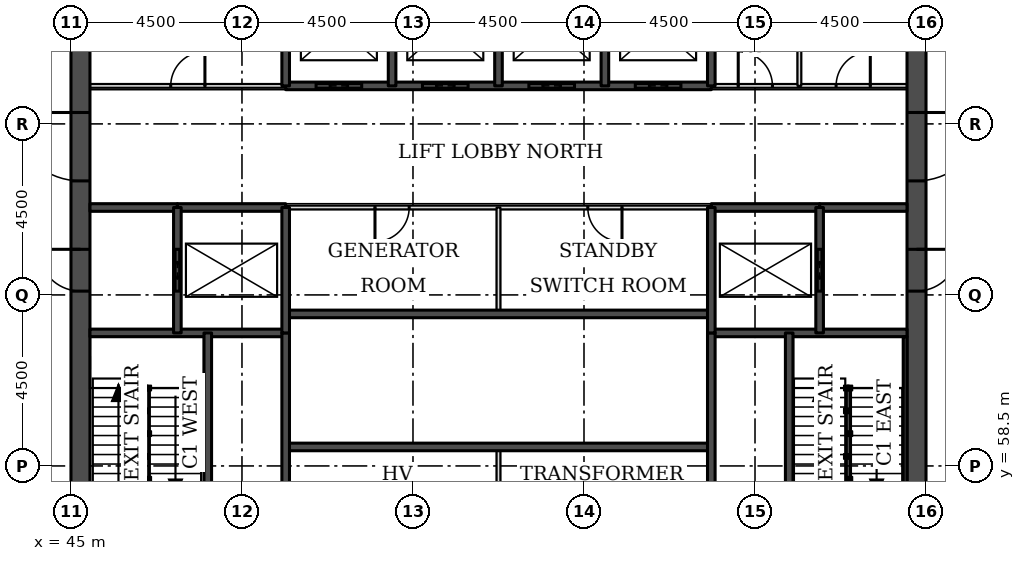
"""IFC4 building model, lengths in metres.
Left out: names, types, materials, properties, quantities, classifications, styles, units other than length and angle.
Written with IfcOpenShell. Run it as: python <this file> out.ifc"""

import sys

from ifc_helpers import new_model, si_unit, direction, frame, frame_2d, origin, place, context, subcontext, project, spatial, rectangle, extrude, element, fill, save


model = new_model("IFC4")
c1 = context("Model", 3, precision=1e-05, world=origin(), true_north=direction((0.0, 1.0)))
c2 = subcontext(c1, "Body", "Model", "MODEL_VIEW")
j1 = project(units=[si_unit("LENGTHUNIT", "METRE"), si_unit("PLANEANGLEUNIT", "RADIAN")], contexts=[c1])
p1 = place(None, origin())
s1 = spatial("IfcSite", under=j1, at=p1, CompositionType="ELEMENT")
p2 = place(p1, origin())
s2 = spatial("IfcBuilding", under=s1, at=p2, CompositionType="ELEMENT")
p3 = place(p2, frame((0.0, 0.0, -4.5)))
s3 = spatial("IfcBuildingStorey", under=s2, at=p3, CompositionType="ELEMENT", Elevation=-4.5)
p4 = place(p3, frame((45.25, 49.5, 0.0), z_axis=(0.0, 0.0, 1.0), x_axis=(0.0, 1.0, 0.0)))
e1 = element("IfcWall", 1, at=p4, inside=s3, PredefinedType="SHEAR", context=c2, shape_type="SweptSolid", body=[
    extrude(rectangle(XDim=22.5, YDim=0.5, at=frame_2d((11.25, 0.0))), origin(), (0.0, 0.0, 1.0), 4.5),
])
p5 = place(p4, frame((4.2, 0.0, 0.0)))
e2 = element("IfcOpeningElement", 2, at=p5, cuts=e1, PredefinedType="OPENING", context=c2, shape_type="SweptSolid", body=[
    extrude(rectangle(XDim=1.8, YDim=2.1, at=frame_2d((0.9, 1.05))), frame((0.0, 0.26, 0.0), z_axis=(0.0, -1.0, 0.0), x_axis=(1.0, 0.0, 0.0)), (0.0, 0.0, 1.0), 0.52),
])
p6 = place(p4, frame((6.9, 0.0, 0.0)))
e3 = element("IfcOpeningElement", 3, at=p6, cuts=e1, PredefinedType="OPENING", context=c2, shape_type="SweptSolid", body=[
    extrude(rectangle(XDim=1.1, YDim=2.1, at=frame_2d((0.55, 1.05))), frame((0.0, 0.26, 0.0), z_axis=(0.0, -1.0, 0.0), x_axis=(1.0, 0.0, 0.0)), (0.0, 0.0, 1.0), 0.52),
])
p7 = place(p4, frame((13.6, 0.0, 0.0)))
e4 = element("IfcOpeningElement", 4, at=p7, cuts=e1, PredefinedType="OPENING", context=c2, shape_type="SweptSolid", body=[
    extrude(rectangle(XDim=1.1, YDim=2.1, at=frame_2d((0.55, 1.05))), frame((0.0, 0.26, 0.0), z_axis=(0.0, -1.0, 0.0), x_axis=(1.0, 0.0, 0.0)), (0.0, 0.0, 1.0), 0.52),
])
p8 = place(p4, frame((16.5, 0.0, 0.0)))
e5 = element("IfcOpeningElement", 5, at=p8, cuts=e1, PredefinedType="OPENING", context=c2, shape_type="SweptSolid", body=[
    extrude(rectangle(XDim=1.8, YDim=2.1, at=frame_2d((0.9, 1.05))), frame((0.0, 0.26, 0.0), z_axis=(0.0, -1.0, 0.0), x_axis=(1.0, 0.0, 0.0)), (0.0, 0.0, 1.0), 0.52),
])
p9 = place(p3, frame((67.25, 49.5, 0.0), z_axis=(0.0, 0.0, 1.0), x_axis=(0.0, 1.0, 0.0)))
e6 = element("IfcWall", 6, at=p9, inside=s3, PredefinedType="SHEAR", context=c2, shape_type="SweptSolid", body=[
    extrude(rectangle(XDim=22.5, YDim=0.5, at=frame_2d((11.25, 0.0))), origin(), (0.0, 0.0, 1.0), 4.5),
])
p10 = place(p9, frame((4.2, 0.0, 0.0)))
e7 = element("IfcOpeningElement", 7, at=p10, cuts=e6, PredefinedType="OPENING", context=c2, shape_type="SweptSolid", body=[
    extrude(rectangle(XDim=1.8, YDim=2.1, at=frame_2d((0.9, 1.05))), frame((0.0, 0.26, 0.0), z_axis=(0.0, -1.0, 0.0), x_axis=(1.0, 0.0, 0.0)), (0.0, 0.0, 1.0), 0.52),
])
p11 = place(p9, frame((6.9, 0.0, 0.0)))
e8 = element("IfcOpeningElement", 8, at=p11, cuts=e6, PredefinedType="OPENING", context=c2, shape_type="SweptSolid", body=[
    extrude(rectangle(XDim=1.1, YDim=2.1, at=frame_2d((0.55, 1.05))), frame((0.0, 0.26, 0.0), z_axis=(0.0, -1.0, 0.0), x_axis=(1.0, 0.0, 0.0)), (0.0, 0.0, 1.0), 0.52),
])
p12 = place(p9, frame((13.6, 0.0, 0.0)))
e9 = element("IfcOpeningElement", 9, at=p12, cuts=e6, PredefinedType="OPENING", context=c2, shape_type="SweptSolid", body=[
    extrude(rectangle(XDim=1.1, YDim=2.1, at=frame_2d((0.55, 1.05))), frame((0.0, 0.26, 0.0), z_axis=(0.0, -1.0, 0.0), x_axis=(1.0, 0.0, 0.0)), (0.0, 0.0, 1.0), 0.52),
])
p13 = place(p9, frame((16.5, 0.0, 0.0)))
e10 = element("IfcOpeningElement", 10, at=p13, cuts=e6, PredefinedType="OPENING", context=c2, shape_type="SweptSolid", body=[
    extrude(rectangle(XDim=1.8, YDim=2.1, at=frame_2d((0.9, 1.05))), frame((0.0, 0.26, 0.0), z_axis=(0.0, -1.0, 0.0), x_axis=(1.0, 0.0, 0.0)), (0.0, 0.0, 1.0), 0.52),
])
p14 = place(p3, frame((50.65, 59.0, 0.0), z_axis=(0.0, 0.0, 1.0), x_axis=(1.0, 0.0, 0.0)))
e11 = element("IfcWall", 11, at=p14, inside=s3, PredefinedType="SOLIDWALL", context=c2, shape_type="SweptSolid", body=[
    extrude(rectangle(XDim=11.2, YDim=0.2, at=frame_2d((5.6, 0.0))), origin(), (0.0, 0.0, 1.0), 4.5),
])
for number, where, z_axis, x_axis in (
    (12, (45.5, 62.0, 0.0), (0.0, 0.0, 1.0), (1.0, 0.0, 0.0)),
    (13, (61.85, 62.0, 0.0), (0.0, 0.0, 1.0), (1.0, 0.0, 0.0)),
):
    element("IfcWall", number, at=place(p3, frame(where, z_axis=z_axis, x_axis=x_axis)), inside=s3, PredefinedType="SOLIDWALL", context=c2, shape_type="SweptSolid", body=[
        extrude(rectangle(XDim=5.15, YDim=0.2, at=frame_2d((2.575, 0.0))), origin(), (0.0, 0.0, 1.0), 4.1),
    ])
p15 = place(p3, frame((50.65, 62.5, 0.0), z_axis=(0.0, 0.0, 1.0), x_axis=(1.0, 0.0, 0.0)))
e14 = element("IfcWall", 14, at=p15, inside=s3, PredefinedType="SOLIDWALL", context=c2, shape_type="SweptSolid", body=[
    extrude(rectangle(XDim=11.2, YDim=0.2, at=frame_2d((5.6, 0.0))), origin(), (0.0, 0.0, 1.0), 4.5),
])
p16 = place(p3, frame((50.65, 65.3, 0.0), z_axis=(0.0, 0.0, 1.0), x_axis=(1.0, 0.0, 0.0)))
e15 = element("IfcWall", 15, at=p16, inside=s3, PredefinedType="PARTITIONING", context=c2, shape_type="SweptSolid", body=[
    extrude(rectangle(XDim=11.2, YDim=0.1, at=frame_2d((5.6, 0.0))), origin(), (0.0, 0.0, 1.0), 4.1),
])
p17 = place(p16, frame((2.35, 0.0, 0.0)))
e16 = element("IfcOpeningElement", 16, at=p17, cuts=e15, PredefinedType="OPENING", context=c2, shape_type="SweptSolid", body=[
    extrude(rectangle(XDim=0.9, YDim=2.1, at=frame_2d((0.45, 1.05))), frame((0.0, 0.06, 0.0), z_axis=(0.0, -1.0, 0.0), x_axis=(1.0, 0.0, 0.0)), (0.0, 0.0, 1.0), 0.12),
])
p18 = place(p16, frame((7.95, 0.0, 0.0)))
e17 = element("IfcOpeningElement", 17, at=p18, cuts=e15, PredefinedType="OPENING", context=c2, shape_type="SweptSolid", body=[
    extrude(rectangle(XDim=0.9, YDim=2.1, at=frame_2d((0.45, 1.05))), frame((0.0, 0.06, 0.0), z_axis=(0.0, -1.0, 0.0), x_axis=(1.0, 0.0, 0.0)), (0.0, 0.0, 1.0), 0.12),
])
for number, where, z_axis, x_axis in (
    (18, (45.5, 65.3, 0.0), (0.0, 0.0, 1.0), (1.0, 0.0, 0.0)),
    (19, (64.7, 65.3, 0.0), (0.0, 0.0, 1.0), (1.0, 0.0, 0.0)),
):
    element("IfcWall", number, at=place(p3, frame(where, z_axis=z_axis, x_axis=x_axis)), inside=s3, PredefinedType="SOLIDWALL", context=c2, shape_type="SweptSolid", body=[
        extrude(rectangle(XDim=2.3, YDim=0.2, at=frame_2d((1.15, 0.0))), origin(), (0.0, 0.0, 1.0), 4.1),
    ])
for number, where, z_axis, x_axis in (
    (20, (47.8, 65.3, 0.0), (0.0, 0.0, 1.0), (1.0, 0.0, 0.0)),
    (21, (61.85, 65.3, 0.0), (0.0, 0.0, 1.0), (1.0, 0.0, 0.0)),
):
    element("IfcWall", number, at=place(p3, frame(where, z_axis=z_axis, x_axis=x_axis)), inside=s3, PredefinedType="SOLIDWALL", context=c2, shape_type="SweptSolid", body=[
        extrude(rectangle(XDim=2.85, YDim=0.2, at=frame_2d((1.425, 0.0))), origin(), (0.0, 0.0, 1.0), 4.1),
    ])
p19 = place(p3, frame((45.5, 68.5, 0.0), z_axis=(0.0, 0.0, 1.0), x_axis=(1.0, 0.0, 0.0)))
e22 = element("IfcWall", 22, at=p19, inside=s3, PredefinedType="PARTITIONING", context=c2, shape_type="SweptSolid", body=[
    extrude(rectangle(XDim=5.15, YDim=0.1, at=frame_2d((2.575, 0.0))), origin(), (0.0, 0.0, 1.0), 4.1),
])
p20 = place(p19, frame((2.125, 0.0, 0.0)))
e23 = element("IfcOpeningElement", 23, at=p20, cuts=e22, PredefinedType="OPENING", context=c2, shape_type="SweptSolid", body=[
    extrude(rectangle(XDim=0.9, YDim=2.1, at=frame_2d((0.45, 1.05))), frame((0.0, 0.06, 0.0), z_axis=(0.0, -1.0, 0.0), x_axis=(1.0, 0.0, 0.0)), (0.0, 0.0, 1.0), 0.12),
])
p21 = place(p3, frame((61.85, 68.5, 0.0), z_axis=(0.0, 0.0, 1.0), x_axis=(1.0, 0.0, 0.0)))
e24 = element("IfcWall", 24, at=p21, inside=s3, PredefinedType="PARTITIONING", context=c2, shape_type="SweptSolid", body=[
    extrude(rectangle(XDim=5.15, YDim=0.1, at=frame_2d((2.575, 0.0))), origin(), (0.0, 0.0, 1.0), 4.1),
])
p22 = place(p21, frame((3.284, 0.0, 0.0)))
e25 = element("IfcOpeningElement", 25, at=p22, cuts=e24, PredefinedType="OPENING", context=c2, shape_type="SweptSolid", body=[
    extrude(rectangle(XDim=0.9, YDim=2.1, at=frame_2d((0.45, 1.05))), frame((0.0, 0.06, 0.0), z_axis=(0.0, -1.0, 0.0), x_axis=(1.0, 0.0, 0.0)), (0.0, 0.0, 1.0), 0.12),
])
p23 = place(p21, frame((0.709, 0.0, 0.0)))
e26 = element("IfcOpeningElement", 26, at=p23, cuts=e24, PredefinedType="OPENING", context=c2, shape_type="SweptSolid", body=[
    extrude(rectangle(XDim=0.9, YDim=2.1, at=frame_2d((0.45, 1.05))), frame((0.0, 0.06, 0.0), z_axis=(0.0, -1.0, 0.0), x_axis=(1.0, 0.0, 0.0)), (0.0, 0.0, 1.0), 0.12),
])
p24 = place(p3, frame((50.65, 68.5, 0.0), z_axis=(0.0, 0.0, 1.0), x_axis=(1.0, 0.0, 0.0)))
e27 = element("IfcWall", 27, at=p24, inside=s3, PredefinedType="SOLIDWALL", context=c2, shape_type="SweptSolid", body=[
    extrude(rectangle(XDim=11.2, YDim=0.2, at=frame_2d((5.6, 0.0))), origin(), (0.0, 0.0, 1.0), 4.1),
])
p25 = place(p24, frame((0.8, 0.0, 0.0)))
e28 = element("IfcOpeningElement", 28, at=p25, cuts=e27, PredefinedType="OPENING", context=c2, shape_type="SweptSolid", body=[
    extrude(rectangle(XDim=1.2, YDim=2.1, at=frame_2d((0.6, 1.05))), frame((0.0, 0.11, 0.0), z_axis=(0.0, -1.0, 0.0), x_axis=(1.0, 0.0, 0.0)), (0.0, 0.0, 1.0), 0.22),
])
p26 = place(p24, frame((3.6, 0.0, 0.0)))
e29 = element("IfcOpeningElement", 29, at=p26, cuts=e27, PredefinedType="OPENING", context=c2, shape_type="SweptSolid", body=[
    extrude(rectangle(XDim=1.2, YDim=2.1, at=frame_2d((0.6, 1.05))), frame((0.0, 0.11, 0.0), z_axis=(0.0, -1.0, 0.0), x_axis=(1.0, 0.0, 0.0)), (0.0, 0.0, 1.0), 0.22),
])
p27 = place(p24, frame((6.4, 0.0, 0.0)))
e30 = element("IfcOpeningElement", 30, at=p27, cuts=e27, PredefinedType="OPENING", context=c2, shape_type="SweptSolid", body=[
    extrude(rectangle(XDim=1.2, YDim=2.1, at=frame_2d((0.6, 1.05))), frame((0.0, 0.11, 0.0), z_axis=(0.0, -1.0, 0.0), x_axis=(1.0, 0.0, 0.0)), (0.0, 0.0, 1.0), 0.22),
])
p28 = place(p24, frame((9.2, 0.0, 0.0)))
e31 = element("IfcOpeningElement", 31, at=p28, cuts=e27, PredefinedType="OPENING", context=c2, shape_type="SweptSolid", body=[
    extrude(rectangle(XDim=1.2, YDim=2.1, at=frame_2d((0.6, 1.05))), frame((0.0, 0.11, 0.0), z_axis=(0.0, -1.0, 0.0), x_axis=(1.0, 0.0, 0.0)), (0.0, 0.0, 1.0), 0.22),
])
p29 = place(p3, frame((47.8, 62.0, 0.0), z_axis=(0.0, 0.0, 1.0), x_axis=(0.0, 1.0, 0.0)))
e32 = element("IfcWall", 32, at=p29, inside=s3, PredefinedType="SOLIDWALL", context=c2, shape_type="SweptSolid", body=[
    extrude(rectangle(XDim=3.3, YDim=0.2, at=frame_2d((1.65, 0.0))), origin(), (0.0, 0.0, 1.0), 4.1),
])
p30 = place(p29, frame((1.1, 0.0, 0.0)))
e33 = element("IfcOpeningElement", 33, at=p30, cuts=e32, PredefinedType="OPENING", context=c2, shape_type="SweptSolid", body=[
    extrude(rectangle(XDim=1.1, YDim=2.1, at=frame_2d((0.55, 1.05))), frame((0.0, 0.11, 0.0), z_axis=(0.0, -1.0, 0.0), x_axis=(1.0, 0.0, 0.0)), (0.0, 0.0, 1.0), 0.22),
])
p31 = place(p3, frame((48.6, 56.2, 0.0), z_axis=(0.0, 0.0, 1.0), x_axis=(0.0, 1.0, 0.0)))
e34 = element("IfcWall", 34, at=p31, inside=s3, PredefinedType="SOLIDWALL", context=c2, shape_type="SweptSolid", body=[
    extrude(rectangle(XDim=5.8, YDim=0.2, at=frame_2d((2.9, 0.0))), origin(), (0.0, 0.0, 1.0), 4.1),
])
p32 = place(p3, frame((50.65, 56.2, 0.0), z_axis=(0.0, 0.0, 1.0), x_axis=(0.0, 1.0, 0.0)))
e35 = element("IfcWall", 35, at=p32, inside=s3, PredefinedType="SOLIDWALL", context=c2, shape_type="SweptSolid", body=[
    extrude(rectangle(XDim=5.8, YDim=0.2, at=frame_2d((2.9, 0.0))), origin(), (0.0, 0.0, 1.0), 4.5),
])
p33 = place(p3, frame((50.65, 62.0, 0.0), z_axis=(0.0, 0.0, 1.0), x_axis=(0.0, 1.0, 0.0)))
e36 = element("IfcWall", 36, at=p33, inside=s3, PredefinedType="SOLIDWALL", context=c2, shape_type="SweptSolid", body=[
    extrude(rectangle(XDim=3.3, YDim=0.2, at=frame_2d((1.65, 0.0))), origin(), (0.0, 0.0, 1.0), 4.1),
])
for number, where, z_axis, x_axis in (
    (37, (50.65, 68.5, 0.0), (0.0, 0.0, 1.0), (0.0, 1.0, 0.0)),
    (38, (53.45, 68.5, 0.0), (0.0, 0.0, 1.0), (0.0, 1.0, 0.0)),
):
    element("IfcWall", number, at=place(p3, frame(where, z_axis=z_axis, x_axis=x_axis)), inside=s3, PredefinedType="SOLIDWALL", context=c2, shape_type="SweptSolid", body=[
        extrude(rectangle(XDim=3.0, YDim=0.2, at=frame_2d((1.5, 0.0))), origin(), (0.0, 0.0, 1.0), 4.1),
    ])
for number, where, z_axis, x_axis in (
    (39, (56.25, 56.2, 0.0), (0.0, 0.0, 1.0), (0.0, 1.0, 0.0)),
    (40, (56.25, 62.5, 0.0), (0.0, 0.0, 1.0), (0.0, 1.0, 0.0)),
):
    element("IfcWall", number, at=place(p3, frame(where, z_axis=z_axis, x_axis=x_axis)), inside=s3, PredefinedType="PARTITIONING", context=c2, shape_type="SweptSolid", body=[
        extrude(rectangle(XDim=2.8, YDim=0.1, at=frame_2d((1.4, 0.0))), origin(), (0.0, 0.0, 1.0), 4.1),
    ])
for number, where, z_axis, x_axis in (
    (41, (56.25, 68.5, 0.0), (0.0, 0.0, 1.0), (0.0, 1.0, 0.0)),
    (42, (59.05, 68.5, 0.0), (0.0, 0.0, 1.0), (0.0, 1.0, 0.0)),
):
    element("IfcWall", number, at=place(p3, frame(where, z_axis=z_axis, x_axis=x_axis)), inside=s3, PredefinedType="SOLIDWALL", context=c2, shape_type="SweptSolid", body=[
        extrude(rectangle(XDim=3.0, YDim=0.2, at=frame_2d((1.5, 0.0))), origin(), (0.0, 0.0, 1.0), 4.1),
    ])
p34 = place(p3, frame((61.85, 56.2, 0.0), z_axis=(0.0, 0.0, 1.0), x_axis=(0.0, 1.0, 0.0)))
e43 = element("IfcWall", 43, at=p34, inside=s3, PredefinedType="SOLIDWALL", context=c2, shape_type="SweptSolid", body=[
    extrude(rectangle(XDim=5.8, YDim=0.2, at=frame_2d((2.9, 0.0))), origin(), (0.0, 0.0, 1.0), 4.5),
])
p35 = place(p3, frame((61.85, 62.0, 0.0), z_axis=(0.0, 0.0, 1.0), x_axis=(0.0, 1.0, 0.0)))
e44 = element("IfcWall", 44, at=p35, inside=s3, PredefinedType="SOLIDWALL", context=c2, shape_type="SweptSolid", body=[
    extrude(rectangle(XDim=3.3, YDim=0.2, at=frame_2d((1.65, 0.0))), origin(), (0.0, 0.0, 1.0), 4.1),
])
p36 = place(p3, frame((61.85, 68.5, 0.0), z_axis=(0.0, 0.0, 1.0), x_axis=(0.0, 1.0, 0.0)))
e45 = element("IfcWall", 45, at=p36, inside=s3, PredefinedType="SOLIDWALL", context=c2, shape_type="SweptSolid", body=[
    extrude(rectangle(XDim=3.0, YDim=0.2, at=frame_2d((1.5, 0.0))), origin(), (0.0, 0.0, 1.0), 4.1),
])
p37 = place(p3, frame((63.9, 56.2, 0.0), z_axis=(0.0, 0.0, 1.0), x_axis=(0.0, 1.0, 0.0)))
e46 = element("IfcWall", 46, at=p37, inside=s3, PredefinedType="SOLIDWALL", context=c2, shape_type="SweptSolid", body=[
    extrude(rectangle(XDim=5.8, YDim=0.2, at=frame_2d((2.9, 0.0))), origin(), (0.0, 0.0, 1.0), 4.1),
])
p38 = place(p3, frame((64.167, 68.5, 0.0), z_axis=(0.0, 0.0, 1.0), x_axis=(0.0, 1.0, 0.0)))
e47 = element("IfcWall", 47, at=p38, inside=s3, PredefinedType="PARTITIONING", context=c2, shape_type="SweptSolid", body=[
    extrude(rectangle(XDim=3.0, YDim=0.1, at=frame_2d((1.5, 0.0))), origin(), (0.0, 0.0, 1.0), 4.1),
])
p39 = place(p3, frame((64.7, 62.0, 0.0), z_axis=(0.0, 0.0, 1.0), x_axis=(0.0, 1.0, 0.0)))
e48 = element("IfcWall", 48, at=p39, inside=s3, PredefinedType="SOLIDWALL", context=c2, shape_type="SweptSolid", body=[
    extrude(rectangle(XDim=3.3, YDim=0.2, at=frame_2d((1.65, 0.0))), origin(), (0.0, 0.0, 1.0), 4.1),
])
p40 = place(p39, frame((1.1, 0.0, 0.0)))
e49 = element("IfcOpeningElement", 49, at=p40, cuts=e48, PredefinedType="OPENING", context=c2, shape_type="SweptSolid", body=[
    extrude(rectangle(XDim=1.1, YDim=2.1, at=frame_2d((0.55, 1.05))), frame((0.0, 0.11, 0.0), z_axis=(0.0, -1.0, 0.0), x_axis=(1.0, 0.0, 0.0)), (0.0, 0.0, 1.0), 0.22),
])
p41 = place(p3, frame((66.95, 57.55, 0.0), z_axis=(0.0, 0.0, 1.0), x_axis=(0.0, 1.0, 0.0)))
e50 = element("IfcWall", 50, at=p41, inside=s3, PredefinedType="SOLIDWALL", context=c2, shape_type="SweptSolid", body=[
    extrude(rectangle(XDim=4.35, YDim=0.1, at=frame_2d((2.175, 0.0))), origin(), (0.0, 0.0, 1.0), 4.1),
])
p42 = place(p25, origin())
e51 = element("IfcDoor", 51, at=p42, inside=s3, OperationType="DOUBLE_DOOR_SLIDING", PredefinedType="DOOR", context=c2, shape_type="SweptSolid", body=[
    extrude(rectangle(XDim=1.2, YDim=2.1, at=frame_2d((0.6, 1.05))), frame((0.0, 0.025, 0.0), z_axis=(0.0, -1.0, 0.0), x_axis=(1.0, 0.0, 0.0)), (0.0, 0.0, 1.0), 0.05),
])
fill(e28, e51)
p43 = place(p26, origin())
e52 = element("IfcDoor", 52, at=p43, inside=s3, OperationType="DOUBLE_DOOR_SLIDING", PredefinedType="DOOR", context=c2, shape_type="SweptSolid", body=[
    extrude(rectangle(XDim=1.2, YDim=2.1, at=frame_2d((0.6, 1.05))), frame((0.0, 0.025, 0.0), z_axis=(0.0, -1.0, 0.0), x_axis=(1.0, 0.0, 0.0)), (0.0, 0.0, 1.0), 0.05),
])
fill(e29, e52)
p44 = place(p27, origin())
e53 = element("IfcDoor", 53, at=p44, inside=s3, OperationType="DOUBLE_DOOR_SLIDING", PredefinedType="DOOR", context=c2, shape_type="SweptSolid", body=[
    extrude(rectangle(XDim=1.2, YDim=2.1, at=frame_2d((0.6, 1.05))), frame((0.0, 0.025, 0.0), z_axis=(0.0, -1.0, 0.0), x_axis=(1.0, 0.0, 0.0)), (0.0, 0.0, 1.0), 0.05),
])
fill(e30, e53)
p45 = place(p28, origin())
e54 = element("IfcDoor", 54, at=p45, inside=s3, OperationType="DOUBLE_DOOR_SLIDING", PredefinedType="DOOR", context=c2, shape_type="SweptSolid", body=[
    extrude(rectangle(XDim=1.2, YDim=2.1, at=frame_2d((0.6, 1.05))), frame((0.0, 0.025, 0.0), z_axis=(0.0, -1.0, 0.0), x_axis=(1.0, 0.0, 0.0)), (0.0, 0.0, 1.0), 0.05),
])
fill(e31, e54)
p46 = place(p30, origin())
e55 = element("IfcDoor", 55, at=p46, inside=s3, OperationType="DOUBLE_DOOR_SLIDING", PredefinedType="DOOR", context=c2, shape_type="SweptSolid", body=[
    extrude(rectangle(XDim=1.1, YDim=2.1, at=frame_2d((0.55, 1.05))), frame((0.0, 0.025, 0.0), z_axis=(0.0, -1.0, 0.0), x_axis=(1.0, 0.0, 0.0)), (0.0, 0.0, 1.0), 0.05),
])
fill(e33, e55)
p47 = place(p40, origin())
e56 = element("IfcDoor", 56, at=p47, inside=s3, OperationType="DOUBLE_DOOR_SLIDING", PredefinedType="DOOR", context=c2, shape_type="SweptSolid", body=[
    extrude(rectangle(XDim=1.1, YDim=2.1, at=frame_2d((0.55, 1.05))), frame((0.0, 0.025, 0.0), z_axis=(0.0, -1.0, 0.0), x_axis=(1.0, 0.0, 0.0)), (0.0, 0.0, 1.0), 0.05),
])
fill(e49, e56)
p48 = place(p7, origin())
e57 = element("IfcDoor", 57, at=p48, inside=s3, OperationType="SINGLE_SWING_RIGHT", PredefinedType="DOOR", context=c2, shape_type="SweptSolid", body=[
    extrude(rectangle(XDim=1.1, YDim=2.1, at=frame_2d((0.55, 1.05))), frame((0.0, 0.025, 0.0), z_axis=(0.0, -1.0, 0.0), x_axis=(1.0, 0.0, 0.0)), (0.0, 0.0, 1.0), 0.05),
])
fill(e4, e57)
p49 = place(p8, origin())
e58 = element("IfcDoor", 58, at=p49, inside=s3, OperationType="SINGLE_SWING_RIGHT", PredefinedType="DOOR", context=c2, shape_type="SweptSolid", body=[
    extrude(rectangle(XDim=1.8, YDim=2.1, at=frame_2d((0.9, 1.05))), frame((0.0, 0.025, 0.0), z_axis=(0.0, -1.0, 0.0), x_axis=(1.0, 0.0, 0.0)), (0.0, 0.0, 1.0), 0.05),
])
fill(e5, e58)
p50 = place(p12, frame((1.1, 0.0, 0.0), z_axis=(0.0, 0.0, 1.0), x_axis=(-1.0, 0.0, 0.0)))
e59 = element("IfcDoor", 59, at=p50, inside=s3, OperationType="SINGLE_SWING_LEFT", PredefinedType="DOOR", context=c2, shape_type="SweptSolid", body=[
    extrude(rectangle(XDim=1.1, YDim=2.1, at=frame_2d((0.55, 1.05))), frame((0.0, 0.025, 0.0), z_axis=(0.0, -1.0, 0.0), x_axis=(1.0, 0.0, 0.0)), (0.0, 0.0, 1.0), 0.05),
])
fill(e9, e59)
p51 = place(p13, frame((1.8, 0.0, 0.0), z_axis=(0.0, 0.0, 1.0), x_axis=(-1.0, 0.0, 0.0)))
e60 = element("IfcDoor", 60, at=p51, inside=s3, OperationType="SINGLE_SWING_LEFT", PredefinedType="DOOR", context=c2, shape_type="SweptSolid", body=[
    extrude(rectangle(XDim=1.8, YDim=2.1, at=frame_2d((0.9, 1.05))), frame((0.0, 0.025, 0.0), z_axis=(0.0, -1.0, 0.0), x_axis=(1.0, 0.0, 0.0)), (0.0, 0.0, 1.0), 0.05),
])
fill(e10, e60)
p52 = place(p22, origin())
e61 = element("IfcDoor", 61, at=p52, inside=s3, OperationType="SINGLE_SWING_RIGHT", PredefinedType="DOOR", context=c2, shape_type="SweptSolid", body=[
    extrude(rectangle(XDim=0.9, YDim=2.1, at=frame_2d((0.45, 1.05))), frame((0.0, 0.025, 0.0), z_axis=(0.0, -1.0, 0.0), x_axis=(1.0, 0.0, 0.0)), (0.0, 0.0, 1.0), 0.05),
])
fill(e25, e61)
p53 = place(p23, origin())
e62 = element("IfcDoor", 62, at=p53, inside=s3, OperationType="SINGLE_SWING_LEFT", PredefinedType="DOOR", context=c2, shape_type="SweptSolid", body=[
    extrude(rectangle(XDim=0.9, YDim=2.1, at=frame_2d((0.45, 1.05))), frame((0.0, 0.025, 0.0), z_axis=(0.0, -1.0, 0.0), x_axis=(1.0, 0.0, 0.0)), (0.0, 0.0, 1.0), 0.05),
])
fill(e26, e62)
p54 = place(p20, origin())
e63 = element("IfcDoor", 63, at=p54, inside=s3, OperationType="SINGLE_SWING_RIGHT", PredefinedType="DOOR", context=c2, shape_type="SweptSolid", body=[
    extrude(rectangle(XDim=0.9, YDim=2.1, at=frame_2d((0.45, 1.05))), frame((0.0, 0.025, 0.0), z_axis=(0.0, -1.0, 0.0), x_axis=(1.0, 0.0, 0.0)), (0.0, 0.0, 1.0), 0.05),
])
fill(e23, e63)
p55 = place(p17, frame((0.9, 0.0, 0.0), z_axis=(0.0, 0.0, 1.0), x_axis=(-1.0, 0.0, 0.0)))
e64 = element("IfcDoor", 64, at=p55, inside=s3, OperationType="SINGLE_SWING_RIGHT", PredefinedType="DOOR", context=c2, shape_type="SweptSolid", body=[
    extrude(rectangle(XDim=0.9, YDim=2.1, at=frame_2d((0.45, 1.05))), frame((0.0, 0.025, 0.0), z_axis=(0.0, -1.0, 0.0), x_axis=(1.0, 0.0, 0.0)), (0.0, 0.0, 1.0), 0.05),
])
fill(e16, e64)
p56 = place(p18, frame((0.9, 0.0, 0.0), z_axis=(0.0, 0.0, 1.0), x_axis=(-1.0, 0.0, 0.0)))
e65 = element("IfcDoor", 65, at=p56, inside=s3, OperationType="SINGLE_SWING_LEFT", PredefinedType="DOOR", context=c2, shape_type="SweptSolid", body=[
    extrude(rectangle(XDim=0.9, YDim=2.1, at=frame_2d((0.45, 1.05))), frame((0.0, 0.025, 0.0), z_axis=(0.0, -1.0, 0.0), x_axis=(1.0, 0.0, 0.0)), (0.0, 0.0, 1.0), 0.05),
])
fill(e17, e65)
save(model, sys.argv[1])
